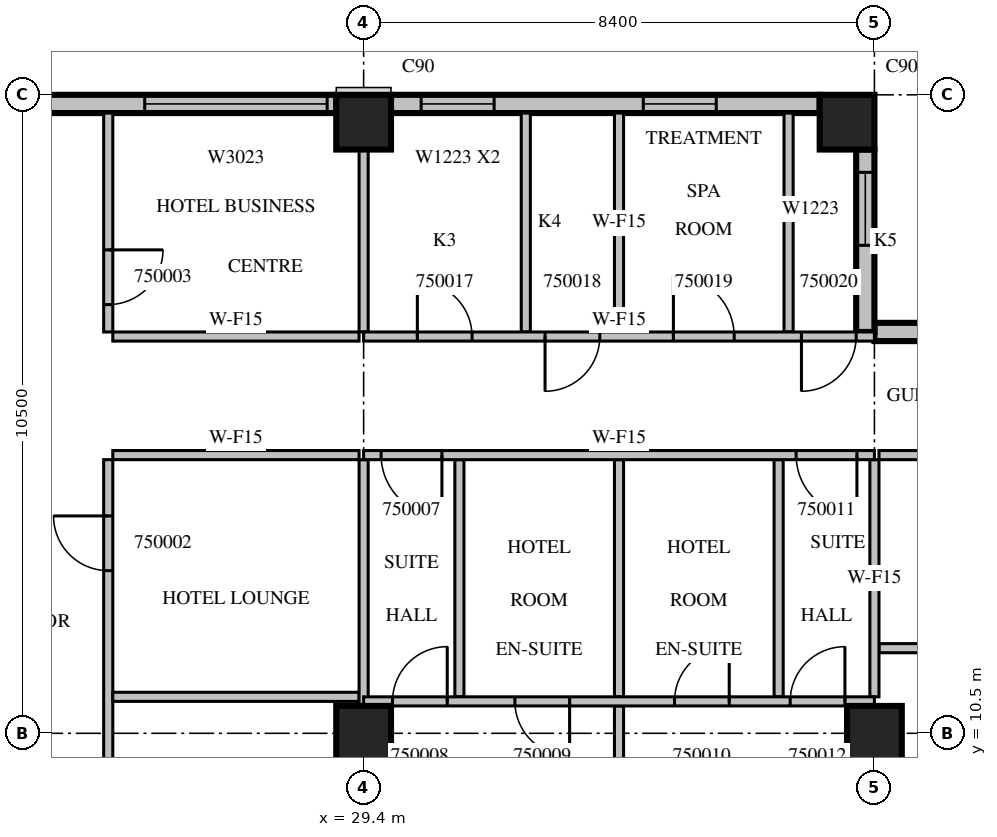
"""IFC4 building model, lengths in metres.
Left out: names, types, materials, properties, quantities, classifications, styles, units other than length and angle.
Written with IfcOpenShell. Run it as: python <this file> out.ifc"""

import sys

from ifc_helpers import new_model, si_unit, direction, frame, frame_2d, origin, origin_2d, place, context, subcontext, project, spatial, rectangle, extrude, source, transform, mapped, element, fill, save


model = new_model("IFC4")
c1 = context("Model", 3, precision=1e-05, world=origin(), true_north=direction((0.0, 1.0)))
c2 = subcontext(c1, "Body", "Model", "MODEL_VIEW")
j1 = project(units=[si_unit("LENGTHUNIT", "METRE"), si_unit("PLANEANGLEUNIT", "RADIAN")], contexts=[c1])
p1 = place(None, origin())
s1 = spatial("IfcSite", under=j1, at=p1, CompositionType="ELEMENT")
p2 = place(p1, origin())
s2 = spatial("IfcBuilding", under=s1, at=p2, CompositionType="ELEMENT")
p3 = place(p2, frame((0.0, 0.0, 223.4)))
s3 = spatial("IfcBuildingStorey", under=s2, at=p3, CompositionType="ELEMENT", Elevation=223.4)
m1 = source(origin(), c2, "Body", "SweptSolid", [
    extrude(rectangle(XDim=0.9, YDim=0.9, at=origin_2d()), origin(), (0.0, 0.0, 1.0), 3.8),
])
for number, where, z_axis, x_axis in (
    (1, (29.4, 10.5, 0.0), (0.0, 0.0, 1.0), (1.0, 0.0, 0.0)),
    (2, (37.8, 10.5, 0.0), (0.0, 0.0, 1.0), (1.0, 0.0, 0.0)),
    (3, (29.4, 20.55, 0.0), (0.0, 0.0, 1.0), (1.0, 0.0, 0.0)),
    (4, (37.35, 20.55, 0.0), (0.0, 0.0, 1.0), (1.0, 0.0, 0.0)),
):
    element("IfcColumn", number, at=place(p3, frame(where, z_axis=z_axis, x_axis=x_axis)), inside=s3, PredefinedType="COLUMN", context=c2, shape_type="MappedRepresentation", body=[
        mapped(m1, transform((0.0, 0.0, 0.0), scale=1.0)),
    ])
m2 = source(origin(), c2, "Body", "SweptSolid", [
    extrude(rectangle(XDim=15.96, YDim=0.3, at=frame_2d((7.98, 0.0))), origin(), (0.0, 0.0, 1.0), 3.4),
])
p4 = place(p3, frame((53.76, 17.1, 0.0), z_axis=(0.0, 0.0, 1.0), x_axis=(-1.0, 0.0, 0.0)))
e5 = element("IfcWall", 5, at=p4, inside=s3, PredefinedType="STANDARD", context=c2, shape_type="MappedRepresentation", body=[
    mapped(m2, transform((0.0, 0.0, 0.0), scale=1.0)),
])
m3 = source(origin(), c2, "Body", "SweptSolid", [
    extrude(rectangle(XDim=3.0, YDim=2.3, at=frame_2d((1.5, 1.15))), frame((0.0, 0.16, 0.0), z_axis=(0.0, -1.0, 0.0), x_axis=(1.0, 0.0, 0.0)), (0.0, 0.0, 1.0), 0.32),
])
p5 = place(p4, frame((0.6, 0.0, 0.6)))
e6 = element("IfcOpeningElement", 6, at=p5, cuts=e5, PredefinedType="OPENING", context=c2, shape_type="MappedRepresentation", body=[
    mapped(m3, transform((0.0, 0.0, 0.0), scale=1.0)),
])
p6 = place(p4, frame((4.8, 0.0, 0.6)))
e7 = element("IfcOpeningElement", 7, at=p6, cuts=e5, PredefinedType="OPENING", context=c2, shape_type="MappedRepresentation", body=[
    mapped(m3, transform((0.0, 0.0, 0.0), scale=1.0)),
])
m4 = source(origin(), c2, "Body", "SweptSolid", [
    extrude(rectangle(XDim=3.6, YDim=2.3, at=frame_2d((1.8, 1.15))), frame((0.0, 0.16, 0.0), z_axis=(0.0, -1.0, 0.0), x_axis=(1.0, 0.0, 0.0)), (0.0, 0.0, 1.0), 0.32),
])
p7 = place(p4, frame((9.54, 0.0, 0.6)))
e8 = element("IfcOpeningElement", 8, at=p7, cuts=e5, PredefinedType="OPENING", context=c2, shape_type="MappedRepresentation", body=[
    mapped(m4, transform((0.0, 0.0, 0.0), scale=1.0)),
])
m5 = source(origin(), c2, "Body", "SweptSolid", [
    extrude(rectangle(XDim=3.0, YDim=0.3, at=frame_2d((1.5, 0.0))), origin(), (0.0, 0.0, 1.0), 3.4),
])
p8 = place(p3, frame((37.65, 17.1, 0.0), z_axis=(0.0, 0.0, 1.0), x_axis=(0.0, 1.0, 0.0)))
e9 = element("IfcWall", 9, at=p8, inside=s3, PredefinedType="STANDARD", context=c2, shape_type="MappedRepresentation", body=[
    mapped(m5, transform((0.0, 0.0, 0.0), scale=1.0)),
])
m6 = source(origin(), c2, "Body", "SweptSolid", [
    extrude(rectangle(XDim=1.2, YDim=2.3, at=frame_2d((0.6, 1.15))), frame((0.0, 0.16, 0.0), z_axis=(0.0, -1.0, 0.0), x_axis=(1.0, 0.0, 0.0)), (0.0, 0.0, 1.0), 0.32),
])
p9 = place(p8, frame((1.425, 0.0, 0.6)))
e10 = element("IfcOpeningElement", 10, at=p9, cuts=e9, PredefinedType="OPENING", context=c2, shape_type="MappedRepresentation", body=[
    mapped(m6, transform((0.0, 0.0, 0.0), scale=1.0)),
])
m7 = source(origin(), c2, "Body", "SweptSolid", [
    extrude(rectangle(XDim=7.05, YDim=0.3, at=frame_2d((3.525, 0.0))), origin(), (0.0, 0.0, 1.0), 3.4),
])
p10 = place(p3, frame((36.9, 20.85, 0.0), z_axis=(0.0, 0.0, 1.0), x_axis=(-1.0, 0.0, 0.0)))
e11 = element("IfcWall", 11, at=p10, inside=s3, PredefinedType="STANDARD", context=c2, shape_type="MappedRepresentation", body=[
    mapped(m7, transform((0.0, 0.0, 0.0), scale=1.0)),
])
p11 = place(p10, frame((5.354, 0.0, 0.6)))
e12 = element("IfcOpeningElement", 12, at=p11, cuts=e11, PredefinedType="OPENING", context=c2, shape_type="MappedRepresentation", body=[
    mapped(m6, transform((0.0, 0.0, 0.0), scale=1.0)),
])
p12 = place(p10, frame((1.701, 0.0, 0.6)))
e13 = element("IfcOpeningElement", 13, at=p12, cuts=e11, PredefinedType="OPENING", context=c2, shape_type="MappedRepresentation", body=[
    mapped(m6, transform((0.0, 0.0, 0.0), scale=1.0)),
])
m8 = source(origin(), c2, "Body", "SweptSolid", [
    extrude(rectangle(XDim=7.15, YDim=0.3, at=frame_2d((3.575, 0.0))), origin(), (0.0, 0.0, 1.0), 3.4),
])
p13 = place(p3, frame((28.95, 20.85, 0.0), z_axis=(0.0, 0.0, 1.0), x_axis=(-1.0, 0.0, 0.0)))
e14 = element("IfcWall", 14, at=p13, inside=s3, PredefinedType="STANDARD", context=c2, shape_type="MappedRepresentation", body=[
    mapped(m8, transform((0.0, 0.0, 0.0), scale=1.0)),
])
p14 = place(p13, frame((0.15, 0.0, 0.6)))
e15 = element("IfcOpeningElement", 15, at=p14, cuts=e14, PredefinedType="OPENING", context=c2, shape_type="MappedRepresentation", body=[
    mapped(m3, transform((0.0, 0.0, 0.0), scale=1.0)),
])
m9 = source(origin(), c2, "Body", "SweptSolid", [
    extrude(rectangle(XDim=1.8, YDim=2.3, at=frame_2d((0.9, 1.15))), frame((0.0, 0.16, 0.0), z_axis=(0.0, -1.0, 0.0), x_axis=(1.0, 0.0, 0.0)), (0.0, 0.0, 1.0), 0.32),
])
p15 = place(p13, frame((4.95, 0.0, 0.6)))
e16 = element("IfcOpeningElement", 16, at=p15, cuts=e14, PredefinedType="OPENING", context=c2, shape_type="MappedRepresentation", body=[
    mapped(m9, transform((0.0, 0.0, 0.0), scale=1.0)),
])
m10 = source(origin(), c2, "Body", "SweptSolid", [
    extrude(rectangle(XDim=11.525, YDim=0.15, at=frame_2d((5.763, 0.0))), origin(), (0.0, 0.0, 1.0), 3.4),
])
p16 = place(p3, frame((25.2, 15.0, 0.0), z_axis=(0.0, 0.0, 1.0), x_axis=(0.0, -1.0, 0.0)))
e17 = element("IfcWall", 17, at=p16, inside=s3, PredefinedType="PARTITIONING", context=c2, shape_type="MappedRepresentation", body=[
    mapped(m10, transform((0.0, 0.0, 0.0), scale=1.0)),
])
m11 = source(origin(), c2, "Body", "SweptSolid", [
    extrude(rectangle(XDim=0.9, YDim=2.1, at=frame_2d((0.45, 1.05))), frame((0.0, 0.085, 0.0), z_axis=(0.0, -1.0, 0.0), x_axis=(1.0, 0.0, 0.0)), (0.0, 0.0, 1.0), 0.17),
])
p17 = place(p16, frame((7.562, 0.0, 0.0)))
e18 = element("IfcOpeningElement", 18, at=p17, cuts=e17, PredefinedType="OPENING", context=c2, shape_type="MappedRepresentation", body=[
    mapped(m11, transform((0.0, 0.0, 0.0), scale=1.0)),
])
p18 = place(p16, frame((0.925, 0.0, 0.0)))
e19 = element("IfcOpeningElement", 19, at=p18, cuts=e17, PredefinedType="OPENING", context=c2, shape_type="MappedRepresentation", body=[
    mapped(m11, transform((0.0, 0.0, 0.0), scale=1.0)),
])
m12 = source(origin(), c2, "Body", "SweptSolid", [
    extrude(rectangle(XDim=3.6, YDim=0.15, at=frame_2d((1.8, 0.0))), origin(), (0.0, 0.0, 1.0), 3.4),
])
p19 = place(p3, frame((25.2, 20.7, 0.0), z_axis=(0.0, 0.0, 1.0), x_axis=(0.0, -1.0, 0.0)))
e20 = element("IfcWall", 20, at=p19, inside=s3, PredefinedType="PARTITIONING", context=c2, shape_type="MappedRepresentation", body=[
    mapped(m12, transform((0.0, 0.0, 0.0), scale=1.0)),
])
p20 = place(p19, frame((2.25, 0.0, 0.0)))
e21 = element("IfcOpeningElement", 21, at=p20, cuts=e20, PredefinedType="OPENING", context=c2, shape_type="MappedRepresentation", body=[
    mapped(m11, transform((0.0, 0.0, 0.0), scale=1.0)),
])
p21 = place(p3, frame((29.325, 11.1, 0.0), z_axis=(0.0, 0.0, 1.0), x_axis=(-1.0, 0.0, 0.0)))
e22 = element("IfcWall", 22, at=p21, inside=s3, PredefinedType="PARTITIONING", context=c2, shape_type="SweptSolid", body=[
    extrude(rectangle(XDim=4.05, YDim=0.15, at=frame_2d((2.025, 0.0))), origin(), (0.0, 0.0, 1.0), 3.4),
])
m13 = source(origin(), c2, "Body", "SweptSolid", [
    extrude(rectangle(XDim=4.05, YDim=0.15, at=frame_2d((2.025, 0.0))), origin(), (0.0, 0.0, 1.0), 3.4),
])
for number, where, z_axis, x_axis in (
    (23, (29.325, 15.075, 0.0), (0.0, 0.0, 1.0), (-1.0, 0.0, 0.0)),
    (24, (25.275, 17.025, 0.0), (0.0, 0.0, 1.0), (1.0, 0.0, 0.0)),
):
    element("IfcWall", number, at=place(p3, frame(where, z_axis=z_axis, x_axis=x_axis)), inside=s3, PredefinedType="PARTITIONING", context=c2, shape_type="MappedRepresentation", body=[
        mapped(m13, transform((0.0, 0.0, 0.0), scale=1.0)),
    ])
m14 = source(origin(), c2, "Body", "SweptSolid", [
    extrude(rectangle(XDim=4.051, YDim=0.15, at=frame_2d((2.026, 0.0))), origin(), (0.0, 0.0, 1.0), 3.4),
])
p22 = place(p3, frame((29.4, 10.949, 0.0), z_axis=(0.0, 0.0, 1.0), x_axis=(0.0, 1.0, 0.0)))
e25 = element("IfcWall", 25, at=p22, inside=s3, PredefinedType="PARTITIONING", context=c2, shape_type="MappedRepresentation", body=[
    mapped(m14, transform((0.0, 0.0, 0.0), scale=1.0)),
])
m15 = source(origin(), c2, "Body", "SweptSolid", [
    extrude(rectangle(XDim=3.001, YDim=0.15, at=frame_2d((1.5, 0.0))), origin(), (0.0, 0.0, 1.0), 3.4),
])
p23 = place(p3, frame((29.4, 17.1, 0.0), z_axis=(0.0, 0.0, 1.0), x_axis=(0.0, 1.0, 0.0)))
e26 = element("IfcWall", 26, at=p23, inside=s3, PredefinedType="PARTITIONING", context=c2, shape_type="MappedRepresentation", body=[
    mapped(m15, transform((0.0, 0.0, 0.0), scale=1.0)),
])
m16 = source(origin(), c2, "Body", "SweptSolid", [
    extrude(rectangle(XDim=6.45, YDim=0.15, at=frame_2d((3.225, 0.0))), origin(), (0.0, 0.0, 1.0), 3.4),
])
p24 = place(p3, frame((37.875, 11.9, 0.0), z_axis=(0.0, 0.0, 1.0), x_axis=(1.0, 0.0, 0.0)))
e27 = element("IfcWall", 27, at=p24, inside=s3, PredefinedType="PARTITIONING", context=c2, shape_type="MappedRepresentation", body=[
    mapped(m16, transform((0.0, 0.0, 0.0), scale=1.0)),
])
p25 = place(p3, frame((44.325, 15.075, 0.0), z_axis=(0.0, 0.0, 1.0), x_axis=(-1.0, 0.0, 0.0)))
e28 = element("IfcWall", 28, at=p25, inside=s3, PredefinedType="PARTITIONING", context=c2, shape_type="MappedRepresentation", body=[
    mapped(m16, transform((0.0, 0.0, 0.0), scale=1.0)),
])
p26 = place(p25, frame((2.812, 0.0, 0.0)))
e29 = element("IfcOpeningElement", 29, at=p26, cuts=e28, PredefinedType="OPENING", context=c2, shape_type="MappedRepresentation", body=[
    mapped(m11, transform((0.0, 0.0, 0.0), scale=1.0)),
])
m17 = source(origin(), c2, "Body", "SweptSolid", [
    extrude(rectangle(XDim=10.65, YDim=0.15, at=frame_2d((5.325, 0.0))), origin(), (0.0, 0.0, 1.0), 3.4),
])
p27 = place(p3, frame((33.6, 0.3, 0.0), z_axis=(0.0, 0.0, 1.0), x_axis=(0.0, 1.0, 0.0)))
e30 = element("IfcWall", 30, at=p27, inside=s3, PredefinedType="PARTITIONING", context=c2, shape_type="MappedRepresentation", body=[
    mapped(m17, transform((0.0, 0.0, 0.0), scale=1.0)),
])
p28 = place(p27, frame((6.375, 0.0, 0.0)))
e31 = element("IfcOpeningElement", 31, at=p28, cuts=e30, PredefinedType="OPENING", context=c2, shape_type="MappedRepresentation", body=[
    mapped(m11, transform((0.0, 0.0, 0.0), scale=1.0)),
])
m18 = source(origin(), c2, "Body", "SweptSolid", [
    extrude(rectangle(XDim=3.9, YDim=0.15, at=frame_2d((1.95, 0.0))), origin(), (0.0, 0.0, 1.0), 3.4),
])
for number, where, z_axis, x_axis in (
    (32, (30.975, 11.1, 0.0), (0.0, 0.0, 1.0), (0.0, 1.0, 0.0)),
    (33, (33.6, 11.1, 0.0), (0.0, 0.0, 1.0), (0.0, 1.0, 0.0)),
    (34, (36.225, 11.1, 0.0), (0.0, 0.0, 1.0), (0.0, 1.0, 0.0)),
    (35, (37.8, 11.1, 0.0), (0.0, 0.0, 1.0), (0.0, 1.0, 0.0)),
):
    element("IfcWall", number, at=place(p3, frame(where, z_axis=z_axis, x_axis=x_axis)), inside=s3, PredefinedType="PARTITIONING", context=c2, shape_type="MappedRepresentation", body=[
        mapped(m18, transform((0.0, 0.0, 0.0), scale=1.0)),
    ])
m19 = source(origin(), c2, "Body", "SweptSolid", [
    extrude(rectangle(XDim=8.4, YDim=0.15, at=frame_2d((4.2, 0.0))), origin(), (0.0, 0.0, 1.0), 3.4),
])
p29 = place(p3, frame((37.8, 11.025, 0.0), z_axis=(0.0, 0.0, 1.0), x_axis=(-1.0, 0.0, 0.0)))
e36 = element("IfcWall", 36, at=p29, inside=s3, PredefinedType="PARTITIONING", context=c2, shape_type="MappedRepresentation", body=[
    mapped(m19, transform((0.0, 0.0, 0.0), scale=1.0)),
])
p30 = place(p29, frame((7.025, 0.0, 0.0)))
e37 = element("IfcOpeningElement", 37, at=p30, cuts=e36, PredefinedType="OPENING", context=c2, shape_type="MappedRepresentation", body=[
    mapped(m11, transform((0.0, 0.0, 0.0), scale=1.0)),
])
p31 = place(p29, frame((5.013, 0.0, 0.0)))
e38 = element("IfcOpeningElement", 38, at=p31, cuts=e36, PredefinedType="OPENING", context=c2, shape_type="MappedRepresentation", body=[
    mapped(m11, transform((0.0, 0.0, 0.0), scale=1.0)),
])
p32 = place(p29, frame((2.388, 0.0, 0.0)))
e39 = element("IfcOpeningElement", 39, at=p32, cuts=e36, PredefinedType="OPENING", context=c2, shape_type="MappedRepresentation", body=[
    mapped(m11, transform((0.0, 0.0, 0.0), scale=1.0)),
])
p33 = place(p29, frame((0.485, 0.0, 0.0)))
e40 = element("IfcOpeningElement", 40, at=p33, cuts=e36, PredefinedType="OPENING", context=c2, shape_type="MappedRepresentation", body=[
    mapped(m11, transform((0.0, 0.0, 0.0), scale=1.0)),
])
for number, where, z_axis, x_axis in (
    (41, (32.067, 20.7, 0.0), (0.0, 0.0, 1.0), (0.0, -1.0, 0.0)),
    (42, (36.389, 20.7, 0.0), (0.0, 0.0, 1.0), (0.0, -1.0, 0.0)),
    (43, (33.6, 17.1, 0.0), (0.0, 0.0, 1.0), (0.0, 1.0, 0.0)),
):
    element("IfcWall", number, at=place(p3, frame(where, z_axis=z_axis, x_axis=x_axis)), inside=s3, PredefinedType="PARTITIONING", context=c2, shape_type="MappedRepresentation", body=[
        mapped(m12, transform((0.0, 0.0, 0.0), scale=1.0)),
    ])
p34 = place(p3, frame((37.8, 15.075, 0.0), z_axis=(0.0, 0.0, 1.0), x_axis=(-1.0, 0.0, 0.0)))
e44 = element("IfcWall", 44, at=p34, inside=s3, PredefinedType="PARTITIONING", context=c2, shape_type="MappedRepresentation", body=[
    mapped(m19, transform((0.0, 0.0, 0.0), scale=1.0)),
])
m20 = source(origin(), c2, "Body", "SweptSolid", [
    extrude(rectangle(XDim=1.0, YDim=2.1, at=frame_2d((0.5, 1.05))), frame((0.0, 0.085, 0.0), z_axis=(0.0, -1.0, 0.0), x_axis=(1.0, 0.0, 0.0)), (0.0, 0.0, 1.0), 0.17),
])
p35 = place(p34, frame((7.112, 0.0, 0.0)))
e45 = element("IfcOpeningElement", 45, at=p35, cuts=e44, PredefinedType="OPENING", context=c2, shape_type="MappedRepresentation", body=[
    mapped(m20, transform((0.0, 0.0, 0.0), scale=1.0)),
])
p36 = place(p34, frame((0.287, 0.0, 0.0)))
e46 = element("IfcOpeningElement", 46, at=p36, cuts=e44, PredefinedType="OPENING", context=c2, shape_type="MappedRepresentation", body=[
    mapped(m20, transform((0.0, 0.0, 0.0), scale=1.0)),
])
p37 = place(p3, frame((29.4, 17.025, 0.0), z_axis=(0.0, 0.0, 1.0), x_axis=(1.0, 0.0, 0.0)))
e47 = element("IfcWall", 47, at=p37, inside=s3, PredefinedType="PARTITIONING", context=c2, shape_type="MappedRepresentation", body=[
    mapped(m19, transform((0.0, 0.0, 0.0), scale=1.0)),
])
p38 = place(p37, frame((0.883, 0.0, 0.0)))
e48 = element("IfcOpeningElement", 48, at=p38, cuts=e47, PredefinedType="OPENING", context=c2, shape_type="MappedRepresentation", body=[
    mapped(m11, transform((0.0, 0.0, 0.0), scale=1.0)),
])
p39 = place(p37, frame((2.983, 0.0, 0.0)))
e49 = element("IfcOpeningElement", 49, at=p39, cuts=e47, PredefinedType="OPENING", context=c2, shape_type="MappedRepresentation", body=[
    mapped(m11, transform((0.0, 0.0, 0.0), scale=1.0)),
])
p40 = place(p37, frame((5.094, 0.0, 0.0)))
e50 = element("IfcOpeningElement", 50, at=p40, cuts=e47, PredefinedType="OPENING", context=c2, shape_type="MappedRepresentation", body=[
    mapped(m20, transform((0.0, 0.0, 0.0), scale=1.0)),
])
p41 = place(p37, frame((7.2, 0.0, 0.0)))
e51 = element("IfcOpeningElement", 51, at=p41, cuts=e47, PredefinedType="OPENING", context=c2, shape_type="MappedRepresentation", body=[
    mapped(m11, transform((0.0, 0.0, 0.0), scale=1.0)),
])
m21 = source(origin(), c2, "Body", "SweptSolid", [
    extrude(rectangle(XDim=1.2, YDim=2.3, at=frame_2d((0.6, 1.15))), frame((0.0, 0.03, 0.0), z_axis=(0.0, -1.0, 0.0), x_axis=(1.0, 0.0, 0.0)), (0.0, 0.0, 1.0), 0.06),
])
p42 = place(p9, origin())
e52 = element("IfcWindow", 52, at=p42, inside=s3, PartitioningType="SINGLE_PANEL", PredefinedType="WINDOW", context=c2, shape_type="MappedRepresentation", body=[
    mapped(m21, transform((0.0, 0.0, 0.0), scale=1.0)),
])
fill(e10, e52)
p43 = place(p11, origin())
e53 = element("IfcWindow", 53, at=p43, inside=s3, PartitioningType="SINGLE_PANEL", PredefinedType="WINDOW", context=c2, shape_type="MappedRepresentation", body=[
    mapped(m21, transform((0.0, 0.0, 0.0), scale=1.0)),
])
fill(e12, e53)
p44 = place(p12, origin())
e54 = element("IfcWindow", 54, at=p44, inside=s3, PartitioningType="SINGLE_PANEL", PredefinedType="WINDOW", context=c2, shape_type="MappedRepresentation", body=[
    mapped(m21, transform((0.0, 0.0, 0.0), scale=1.0)),
])
fill(e13, e54)
m22 = source(origin(), c2, "Body", "SweptSolid", [
    extrude(rectangle(XDim=3.0, YDim=2.3, at=frame_2d((1.5, 1.15))), frame((0.0, 0.03, 0.0), z_axis=(0.0, -1.0, 0.0), x_axis=(1.0, 0.0, 0.0)), (0.0, 0.0, 1.0), 0.06),
])
p45 = place(p14, origin())
e55 = element("IfcWindow", 55, at=p45, inside=s3, PartitioningType="SINGLE_PANEL", PredefinedType="WINDOW", context=c2, shape_type="MappedRepresentation", body=[
    mapped(m22, transform((0.0, 0.0, 0.0), scale=1.0)),
])
fill(e15, e55)
m23 = source(origin(), c2, "Body", "SweptSolid", [
    extrude(rectangle(XDim=0.9, YDim=2.1, at=frame_2d((0.45, 1.05))), frame((0.0, 0.025, 0.0), z_axis=(0.0, -1.0, 0.0), x_axis=(1.0, 0.0, 0.0)), (0.0, 0.0, 1.0), 0.05),
])
p46 = place(p18, origin())
e56 = element("IfcDoor", 56, at=p46, inside=s3, OperationType="SINGLE_SWING_RIGHT", PredefinedType="DOOR", context=c2, shape_type="MappedRepresentation", body=[
    mapped(m23, transform((0.0, 0.0, 0.0), scale=1.0)),
])
fill(e19, e56)
p47 = place(p20, origin())
e57 = element("IfcDoor", 57, at=p47, inside=s3, OperationType="SINGLE_SWING_LEFT", PredefinedType="DOOR", context=c2, shape_type="MappedRepresentation", body=[
    mapped(m23, transform((0.0, 0.0, 0.0), scale=1.0)),
])
fill(e21, e57)
m24 = source(origin(), c2, "Body", "SweptSolid", [
    extrude(rectangle(XDim=1.0, YDim=2.1, at=frame_2d((0.5, 1.05))), frame((0.0, 0.025, 0.0), z_axis=(0.0, -1.0, 0.0), x_axis=(1.0, 0.0, 0.0)), (0.0, 0.0, 1.0), 0.05),
])
p48 = place(p35, origin())
e58 = element("IfcDoor", 58, at=p48, inside=s3, OperationType="SINGLE_SWING_LEFT", PredefinedType="DOOR", context=c2, shape_type="MappedRepresentation", body=[
    mapped(m24, transform((0.0, 0.0, 0.0), scale=1.0)),
])
fill(e45, e58)
p49 = place(p30, origin())
e59 = element("IfcDoor", 59, at=p49, inside=s3, OperationType="SINGLE_SWING_RIGHT", PredefinedType="DOOR", context=c2, shape_type="MappedRepresentation", body=[
    mapped(m23, transform((0.0, 0.0, 0.0), scale=1.0)),
])
fill(e37, e59)
p50 = place(p31, origin())
e60 = element("IfcDoor", 60, at=p50, inside=s3, OperationType="SINGLE_SWING_LEFT", PredefinedType="DOOR", context=c2, shape_type="MappedRepresentation", body=[
    mapped(m23, transform((0.0, 0.0, 0.0), scale=1.0)),
])
fill(e38, e60)
p51 = place(p32, origin())
e61 = element("IfcDoor", 61, at=p51, inside=s3, OperationType="SINGLE_SWING_RIGHT", PredefinedType="DOOR", context=c2, shape_type="MappedRepresentation", body=[
    mapped(m23, transform((0.0, 0.0, 0.0), scale=1.0)),
])
fill(e39, e61)
p52 = place(p36, origin())
e62 = element("IfcDoor", 62, at=p52, inside=s3, OperationType="SINGLE_SWING_LEFT", PredefinedType="DOOR", context=c2, shape_type="MappedRepresentation", body=[
    mapped(m24, transform((0.0, 0.0, 0.0), scale=1.0)),
])
fill(e46, e62)
p53 = place(p33, origin())
e63 = element("IfcDoor", 63, at=p53, inside=s3, OperationType="SINGLE_SWING_RIGHT", PredefinedType="DOOR", context=c2, shape_type="MappedRepresentation", body=[
    mapped(m23, transform((0.0, 0.0, 0.0), scale=1.0)),
])
fill(e40, e63)
p54 = place(p38, origin())
e64 = element("IfcDoor", 64, at=p54, inside=s3, OperationType="SINGLE_SWING_LEFT", PredefinedType="DOOR", context=c2, shape_type="MappedRepresentation", body=[
    mapped(m23, transform((0.0, 0.0, 0.0), scale=1.0)),
])
fill(e48, e64)
p55 = place(p39, origin())
e65 = element("IfcDoor", 65, at=p55, inside=s3, OperationType="SINGLE_SWING_RIGHT", PredefinedType="DOOR", context=c2, shape_type="MappedRepresentation", body=[
    mapped(m23, transform((0.0, 0.0, 0.0), scale=1.0)),
])
fill(e49, e65)
p56 = place(p40, origin())
e66 = element("IfcDoor", 66, at=p56, inside=s3, OperationType="SINGLE_SWING_LEFT", PredefinedType="DOOR", context=c2, shape_type="MappedRepresentation", body=[
    mapped(m24, transform((0.0, 0.0, 0.0), scale=1.0)),
])
fill(e50, e66)
p57 = place(p41, origin())
e67 = element("IfcDoor", 67, at=p57, inside=s3, OperationType="SINGLE_SWING_RIGHT", PredefinedType="DOOR", context=c2, shape_type="MappedRepresentation", body=[
    mapped(m23, transform((0.0, 0.0, 0.0), scale=1.0)),
])
fill(e51, e67)
save(model, sys.argv[1])
